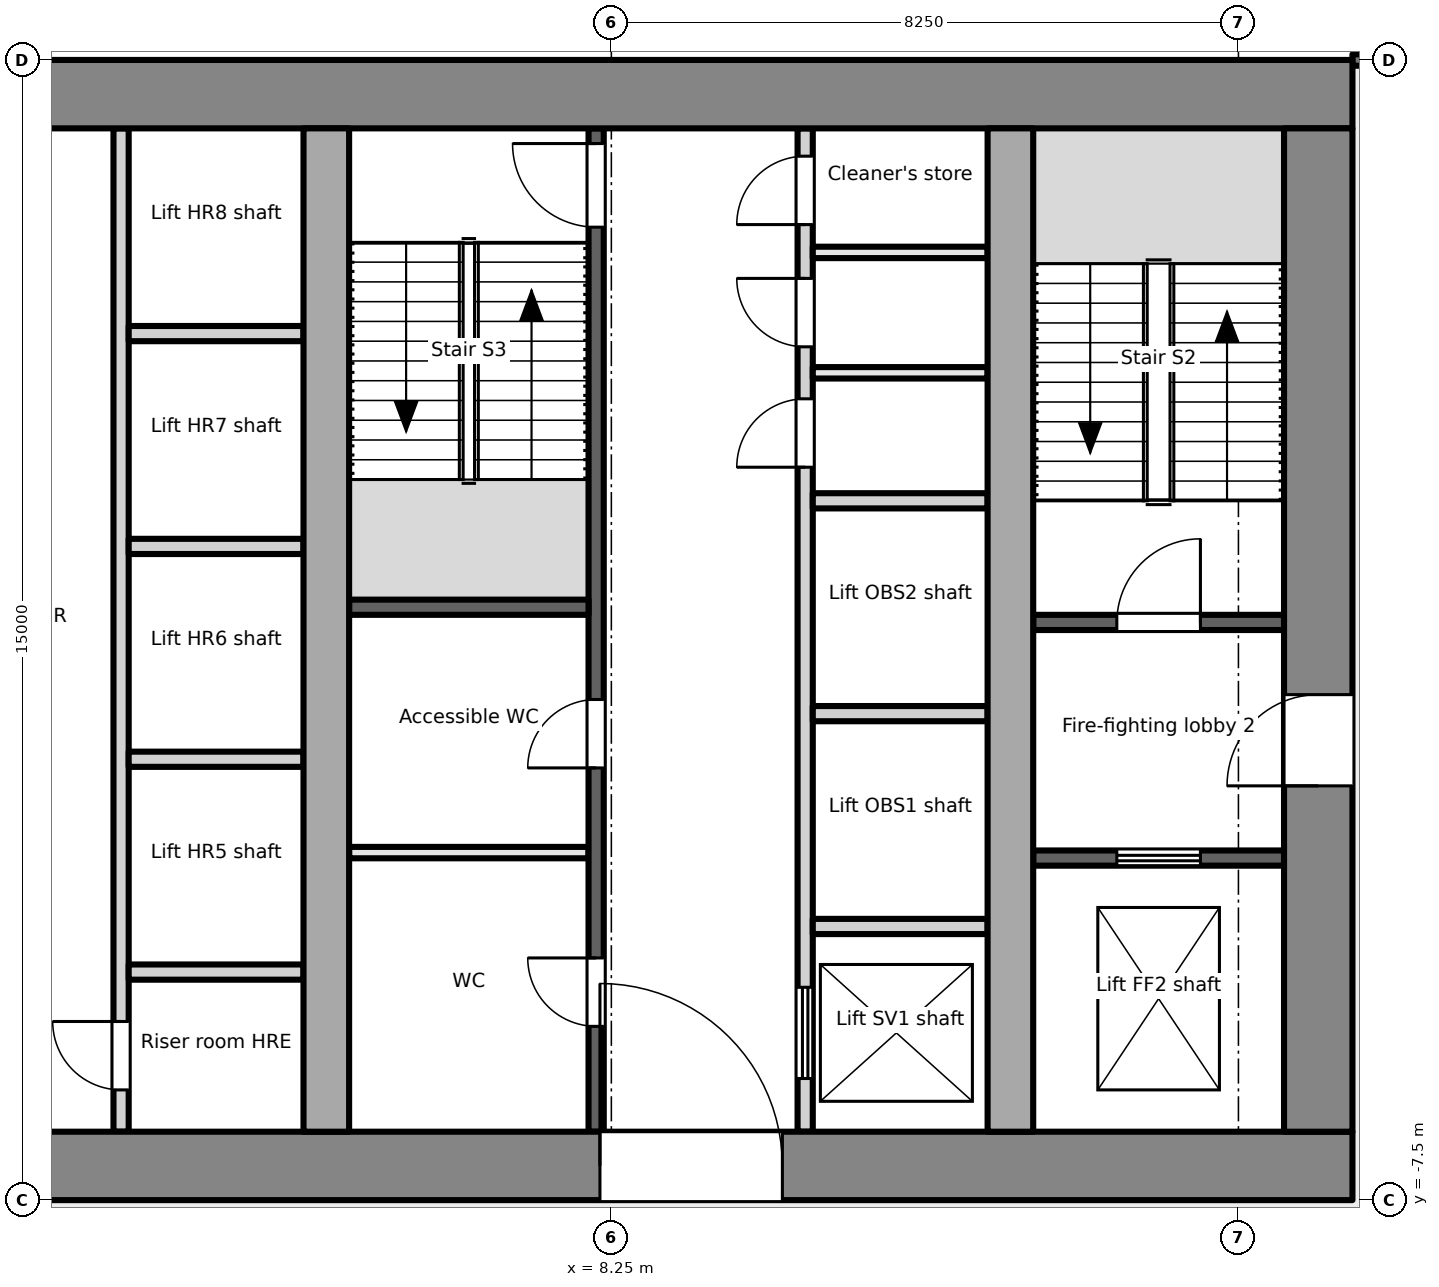
"""IFC4 building model, lengths in metres.
Left out: names, types, materials, properties, quantities, classifications, styles, units other than length and angle.
Written with IfcOpenShell. Run it as: python <this file> out.ifc"""

import sys

from ifc_helpers import new_model, si_unit, direction, frame, frame_2d, origin, place, context, subcontext, project, spatial, rectangle, extrude, element, fill, save


model = new_model("IFC4")
c1 = context("Model", 3, precision=1e-05, world=origin(), true_north=direction((0.0, 1.0)))
c2 = subcontext(c1, "Body", "Model", "MODEL_VIEW")
j1 = project(units=[si_unit("LENGTHUNIT", "METRE"), si_unit("PLANEANGLEUNIT", "RADIAN")], contexts=[c1])
p1 = place(None, origin())
s1 = spatial("IfcSite", under=j1, at=p1, CompositionType="ELEMENT")
p2 = place(p1, origin())
s2 = spatial("IfcBuilding", under=s1, at=p2, CompositionType="ELEMENT")
p3 = place(p2, frame((0.0, 0.0, 12.6)))
s3 = spatial("IfcBuildingStorey", under=s2, at=p3, CompositionType="ELEMENT", Elevation=12.6)
p4 = place(p3, frame((-18.0, -7.05, -0.2), z_axis=(0.0, 0.0, 1.0), x_axis=(1.0, 0.0, 0.0)))
e1 = element("IfcWall", 1, at=p4, inside=s3, PredefinedType="SHEAR", context=c2, shape_type="SweptSolid", body=[
    extrude(rectangle(XDim=36.0, YDim=0.9, at=frame_2d((18.0, 0.0))), origin(), (0.0, 0.0, 1.0), 4.8),
])
p5 = place(p4, frame((7.8, 0.0, 0.2)))
e2 = element("IfcOpeningElement", 2, at=p5, cuts=e1, PredefinedType="OPENING", context=c2, shape_type="SweptSolid", body=[
    extrude(rectangle(XDim=2.4, YDim=2.1, at=frame_2d((1.2, 1.05))), frame((0.0, 0.46, 0.0), z_axis=(0.0, -1.0, 0.0), x_axis=(1.0, 0.0, 0.0)), (0.0, 0.0, 1.0), 0.921),
])
p6 = place(p4, frame((17.4, 0.0, 0.2)))
e3 = element("IfcOpeningElement", 3, at=p6, cuts=e1, PredefinedType="OPENING", context=c2, shape_type="SweptSolid", body=[
    extrude(rectangle(XDim=1.2, YDim=2.1, at=frame_2d((0.6, 1.05))), frame((0.0, 0.46, 0.0), z_axis=(0.0, -1.0, 0.0), x_axis=(1.0, 0.0, 0.0)), (0.0, 0.0, 1.0), 0.921),
])
p7 = place(p4, frame((26.1, 0.0, 0.2)))
e4 = element("IfcOpeningElement", 4, at=p7, cuts=e1, PredefinedType="OPENING", context=c2, shape_type="SweptSolid", body=[
    extrude(rectangle(XDim=2.4, YDim=2.1, at=frame_2d((1.2, 1.05))), frame((0.0, 0.46, 0.0), z_axis=(0.0, -1.0, 0.0), x_axis=(1.0, 0.0, 0.0)), (0.0, 0.0, 1.0), 0.921),
])
p8 = place(p3, frame((-18.0, 7.05, -0.2), z_axis=(0.0, 0.0, 1.0), x_axis=(1.0, 0.0, 0.0)))
e5 = element("IfcWall", 5, at=p8, inside=s3, PredefinedType="SHEAR", context=c2, shape_type="SweptSolid", body=[
    extrude(rectangle(XDim=36.0, YDim=0.9, at=frame_2d((18.0, 0.0))), origin(), (0.0, 0.0, 1.0), 4.8),
])
p9 = place(p3, frame((17.55, -6.6, -0.2), z_axis=(0.0, 0.0, 1.0), x_axis=(0.0, 1.0, 0.0)))
e6 = element("IfcWall", 6, at=p9, inside=s3, PredefinedType="SHEAR", context=c2, shape_type="SweptSolid", body=[
    extrude(rectangle(XDim=13.2, YDim=0.9, at=frame_2d((6.6, 0.0))), origin(), (0.0, 0.0, 1.0), 4.8),
])
p10 = place(p9, frame((4.55, 0.0, 0.2)))
e7 = element("IfcOpeningElement", 7, at=p10, cuts=e6, PredefinedType="OPENING", context=c2, shape_type="SweptSolid", body=[
    extrude(rectangle(XDim=1.2, YDim=2.1, at=frame_2d((0.6, 1.05))), frame((0.0, 0.46, 0.0), z_axis=(0.0, -1.0, 0.0), x_axis=(1.0, 0.0, 0.0)), (0.0, 0.0, 1.0), 0.921),
])
for number, where, z_axis, x_axis in (
    (8, (4.5, -6.6, -0.2), (0.0, 0.0, 1.0), (0.0, 1.0, 0.0)),
    (9, (13.5, -6.6, -0.2), (0.0, 0.0, 1.0), (0.0, 1.0, 0.0)),
):
    element("IfcWall", number, at=place(p3, frame(where, z_axis=z_axis, x_axis=x_axis)), inside=s3, PredefinedType="SHEAR", context=c2, shape_type="SweptSolid", body=[
        extrude(rectangle(XDim=13.2, YDim=0.6, at=frame_2d((6.6, 0.0))), origin(), (0.0, 0.0, 1.0), 4.8),
    ])
p11 = place(p3, frame((13.8, -3.0, 0.0), z_axis=(0.0, 0.0, 1.0), x_axis=(1.0, 0.0, 0.0)))
e10 = element("IfcWall", 10, at=p11, inside=s3, PredefinedType="PARTITIONING", context=c2, shape_type="SweptSolid", body=[
    extrude(rectangle(XDim=3.3, YDim=0.2, at=frame_2d((1.65, 0.0))), origin(), (0.0, 0.0, 1.0), 4.6),
])
p12 = place(p11, frame((1.1, 0.0, 0.0)))
e11 = element("IfcOpeningElement", 11, at=p12, cuts=e10, PredefinedType="OPENING", context=c2, shape_type="SweptSolid", body=[
    extrude(rectangle(XDim=1.1, YDim=2.1, at=frame_2d((0.55, 1.05))), frame((0.0, 0.111, 0.0), z_axis=(0.0, -1.0, 0.0), x_axis=(1.0, 0.0, 0.0)), (0.0, 0.0, 1.0), 0.221),
])
p13 = place(p3, frame((13.8, 0.1, 0.0), z_axis=(0.0, 0.0, 1.0), x_axis=(1.0, 0.0, 0.0)))
e12 = element("IfcWall", 12, at=p13, inside=s3, PredefinedType="PARTITIONING", context=c2, shape_type="SweptSolid", body=[
    extrude(rectangle(XDim=3.3, YDim=0.2, at=frame_2d((1.65, 0.0))), origin(), (0.0, 0.0, 1.0), 4.6),
])
p14 = place(p13, frame((1.1, 0.0, 0.0)))
e13 = element("IfcOpeningElement", 13, at=p14, cuts=e12, PredefinedType="OPENING", context=c2, shape_type="SweptSolid", body=[
    extrude(rectangle(XDim=1.1, YDim=2.1, at=frame_2d((0.55, 1.05))), frame((0.0, 0.111, 0.0), z_axis=(0.0, -1.0, 0.0), x_axis=(1.0, 0.0, 0.0)), (0.0, 0.0, 1.0), 0.221),
])
p15 = place(p3, frame((1.8, -6.6, 0.0), z_axis=(0.0, 0.0, 1.0), x_axis=(0.0, 1.0, 0.0)))
e14 = element("IfcWall", 14, at=p15, inside=s3, PredefinedType="PARTITIONING", context=c2, shape_type="SweptSolid", body=[
    extrude(rectangle(XDim=13.2, YDim=0.2, at=frame_2d((6.6, 0.0))), origin(), (0.0, 0.0, 1.0), 4.6),
])
p16 = place(p15, frame((0.55, 0.0, 0.0)))
e15 = element("IfcOpeningElement", 15, at=p16, cuts=e14, PredefinedType="OPENING", context=c2, shape_type="SweptSolid", body=[
    extrude(rectangle(XDim=0.9, YDim=2.1, at=frame_2d((0.45, 1.05))), frame((0.0, 0.111, 0.0), z_axis=(0.0, -1.0, 0.0), x_axis=(1.0, 0.0, 0.0)), (0.0, 0.0, 1.0), 0.221),
])
for number, where, z_axis, x_axis in (
    (16, (1.9, -1.7, 0.0), (0.0, 0.0, 1.0), (1.0, 0.0, 0.0)),
    (17, (1.9, 1.1, 0.0), (0.0, 0.0, 1.0), (1.0, 0.0, 0.0)),
    (18, (1.9, 3.9, 0.0), (0.0, 0.0, 1.0), (1.0, 0.0, 0.0)),
    (19, (1.9, -4.5, 0.0), (0.0, 0.0, 1.0), (1.0, 0.0, 0.0)),
):
    element("IfcWall", number, at=place(p3, frame(where, z_axis=z_axis, x_axis=x_axis)), inside=s3, PredefinedType="PARTITIONING", context=c2, shape_type="SweptSolid", body=[
        extrude(rectangle(XDim=2.3, YDim=0.2, at=frame_2d((1.15, 0.0))), origin(), (0.0, 0.0, 1.0), 4.6),
    ])
p17 = place(p3, frame((8.05, -6.6, 0.0), z_axis=(0.0, 0.0, 1.0), x_axis=(0.0, 1.0, 0.0)))
e20 = element("IfcWall", 20, at=p17, inside=s3, PredefinedType="PARTITIONING", context=c2, shape_type="SweptSolid", body=[
    extrude(rectangle(XDim=13.2, YDim=0.2, at=frame_2d((6.6, 0.0))), origin(), (0.0, 0.0, 1.0), 4.6),
])
p18 = place(p17, frame((1.386, 0.0, 0.0)))
e21 = element("IfcOpeningElement", 21, at=p18, cuts=e20, PredefinedType="OPENING", context=c2, shape_type="SweptSolid", body=[
    extrude(rectangle(XDim=0.9, YDim=2.1, at=frame_2d((0.45, 1.05))), frame((0.0, 0.111, 0.0), z_axis=(0.0, -1.0, 0.0), x_axis=(1.0, 0.0, 0.0)), (0.0, 0.0, 1.0), 0.221),
])
p19 = place(p17, frame((4.786, 0.0, 0.0)))
e22 = element("IfcOpeningElement", 22, at=p19, cuts=e20, PredefinedType="OPENING", context=c2, shape_type="SweptSolid", body=[
    extrude(rectangle(XDim=0.9, YDim=2.1, at=frame_2d((0.45, 1.05))), frame((0.0, 0.111, 0.0), z_axis=(0.0, -1.0, 0.0), x_axis=(1.0, 0.0, 0.0)), (0.0, 0.0, 1.0), 0.221),
])
p20 = place(p17, frame((11.9, 0.0, 0.0)))
e23 = element("IfcOpeningElement", 23, at=p20, cuts=e20, PredefinedType="OPENING", context=c2, shape_type="SweptSolid", body=[
    extrude(rectangle(XDim=1.1, YDim=2.1, at=frame_2d((0.55, 1.05))), frame((0.0, 0.111, 0.0), z_axis=(0.0, -1.0, 0.0), x_axis=(1.0, 0.0, 0.0)), (0.0, 0.0, 1.0), 0.221),
])
p21 = place(p3, frame((10.8, -6.6, 0.0), z_axis=(0.0, 0.0, 1.0), x_axis=(0.0, 1.0, 0.0)))
e24 = element("IfcWall", 24, at=p21, inside=s3, PredefinedType="PARTITIONING", context=c2, shape_type="SweptSolid", body=[
    extrude(rectangle(XDim=13.2, YDim=0.2, at=frame_2d((6.6, 0.0))), origin(), (0.0, 0.0, 1.0), 4.6),
])
p22 = place(p21, frame((0.7, 0.0, 0.0)))
e25 = element("IfcOpeningElement", 25, at=p22, cuts=e24, PredefinedType="OPENING", context=c2, shape_type="SweptSolid", body=[
    extrude(rectangle(XDim=1.2, YDim=2.1, at=frame_2d((0.6, 1.05))), frame((0.0, 0.111, 0.0), z_axis=(0.0, -1.0, 0.0), x_axis=(1.0, 0.0, 0.0)), (0.0, 0.0, 1.0), 0.221),
])
p23 = place(p21, frame((8.742, 0.0, 0.0)))
e26 = element("IfcOpeningElement", 26, at=p23, cuts=e24, PredefinedType="OPENING", context=c2, shape_type="SweptSolid", body=[
    extrude(rectangle(XDim=0.9, YDim=2.1, at=frame_2d((0.45, 1.05))), frame((0.0, 0.111, 0.0), z_axis=(0.0, -1.0, 0.0), x_axis=(1.0, 0.0, 0.0)), (0.0, 0.0, 1.0), 0.221),
])
p24 = place(p21, frame((10.326, 0.0, 0.0)))
e27 = element("IfcOpeningElement", 27, at=p24, cuts=e24, PredefinedType="OPENING", context=c2, shape_type="SweptSolid", body=[
    extrude(rectangle(XDim=0.9, YDim=2.1, at=frame_2d((0.45, 1.05))), frame((0.0, 0.111, 0.0), z_axis=(0.0, -1.0, 0.0), x_axis=(1.0, 0.0, 0.0)), (0.0, 0.0, 1.0), 0.221),
])
p25 = place(p21, frame((11.934, 0.0, 0.0)))
e28 = element("IfcOpeningElement", 28, at=p25, cuts=e24, PredefinedType="OPENING", context=c2, shape_type="SweptSolid", body=[
    extrude(rectangle(XDim=0.9, YDim=2.1, at=frame_2d((0.45, 1.05))), frame((0.0, 0.111, 0.0), z_axis=(0.0, -1.0, 0.0), x_axis=(1.0, 0.0, 0.0)), (0.0, 0.0, 1.0), 0.221),
])
p26 = place(p3, frame((4.8, 0.3, 0.0), z_axis=(0.0, 0.0, 1.0), x_axis=(1.0, 0.0, 0.0)))
e29 = element("IfcWall", 29, at=p26, inside=s3, PredefinedType="PARTITIONING", context=c2, shape_type="SweptSolid", body=[
    extrude(rectangle(XDim=3.15, YDim=0.2, at=frame_2d((1.575, 0.0))), origin(), (0.0, 0.0, 1.0), 4.6),
])
p27 = place(p3, frame((4.8, -2.928, 0.0), z_axis=(0.0, 0.0, 1.0), x_axis=(1.0, 0.0, 0.0)))
e30 = element("IfcWall", 30, at=p27, inside=s3, PredefinedType="PARTITIONING", context=c2, shape_type="SweptSolid", body=[
    extrude(rectangle(XDim=3.15, YDim=0.15, at=frame_2d((1.575, 0.0))), origin(), (0.0, 0.0, 1.0), 4.6),
])
for number, where, z_axis, x_axis in (
    (31, (10.9, -3.9, 0.0), (0.0, 0.0, 1.0), (1.0, 0.0, 0.0)),
    (32, (10.9, -1.1, 0.0), (0.0, 0.0, 1.0), (1.0, 0.0, 0.0)),
    (33, (10.9, 1.7, 0.0), (0.0, 0.0, 1.0), (1.0, 0.0, 0.0)),
):
    element("IfcWall", number, at=place(p3, frame(where, z_axis=z_axis, x_axis=x_axis)), inside=s3, PredefinedType="PARTITIONING", context=c2, shape_type="SweptSolid", body=[
        extrude(rectangle(XDim=2.3, YDim=0.2, at=frame_2d((1.15, 0.0))), origin(), (0.0, 0.0, 1.0), 4.6),
    ])
for number, where, z_axis, x_axis in (
    (34, (10.9, 3.384, 0.0), (0.0, 0.0, 1.0), (1.0, 0.0, 0.0)),
    (35, (10.9, 4.968, 0.0), (0.0, 0.0, 1.0), (1.0, 0.0, 0.0)),
):
    element("IfcWall", number, at=place(p3, frame(where, z_axis=z_axis, x_axis=x_axis)), inside=s3, PredefinedType="PARTITIONING", context=c2, shape_type="SweptSolid", body=[
        extrude(rectangle(XDim=2.3, YDim=0.15, at=frame_2d((1.15, 0.0))), origin(), (0.0, 0.0, 1.0), 4.6),
    ])
p28 = place(p3, frame((18.0, 7.499, 0.0), z_axis=(0.0, 0.0, 1.0), x_axis=(1.0, 0.0, 0.0)))
e36 = element("IfcWall", 36, at=p28, inside=s3, PredefinedType="PARTITIONING", context=c2, shape_type="SweptSolid", body=[
    extrude(rectangle(XDim=2.91, YDim=0.15, at=frame_2d((1.455, 0.0))), origin(), (0.0, 0.0, 1.0), 4.3),
])
p29 = place(p28, frame((0.628, 0.0, 0.0)))
e37 = element("IfcOpeningElement", 37, at=p29, cuts=e36, PredefinedType="OPENING", context=c2, shape_type="SweptSolid", body=[
    extrude(rectangle(XDim=0.9, YDim=2.1, at=frame_2d((0.45, 1.05))), frame((0.0, 0.085, 0.0), z_axis=(0.0, -1.0, 0.0), x_axis=(1.0, 0.0, 0.0)), (0.0, 0.0, 1.0), 0.171),
])
p30 = place(p12, origin())
e38 = element("IfcDoor", 38, at=p30, inside=s3, OperationType="DOUBLE_DOOR_SLIDING", PredefinedType="DOOR", context=c2, shape_type="SweptSolid", body=[
    extrude(rectangle(XDim=1.1, YDim=2.1, at=frame_2d((0.55, 1.05))), frame((0.0, 0.025, 0.0), z_axis=(0.0, -1.0, 0.0), x_axis=(1.0, 0.0, 0.0)), (0.0, 0.0, 1.0), 0.05),
])
fill(e11, e38)
p31 = place(p10, origin())
e39 = element("IfcDoor", 39, at=p31, inside=s3, OperationType="SINGLE_SWING_LEFT", PredefinedType="DOOR", context=c2, shape_type="SweptSolid", body=[
    extrude(rectangle(XDim=1.2, YDim=2.1, at=frame_2d((0.6, 1.05))), frame((0.0, 0.025, 0.0), z_axis=(0.0, -1.0, 0.0), x_axis=(1.0, 0.0, 0.0)), (0.0, 0.0, 1.0), 0.05),
])
fill(e7, e39)
p32 = place(p14, origin())
e40 = element("IfcDoor", 40, at=p32, inside=s3, OperationType="SINGLE_SWING_RIGHT", PredefinedType="DOOR", context=c2, shape_type="SweptSolid", body=[
    extrude(rectangle(XDim=1.1, YDim=2.1, at=frame_2d((0.55, 1.05))), frame((0.0, 0.025, 0.0), z_axis=(0.0, -1.0, 0.0), x_axis=(1.0, 0.0, 0.0)), (0.0, 0.0, 1.0), 0.05),
])
fill(e13, e40)
p33 = place(p16, origin())
e41 = element("IfcDoor", 41, at=p33, inside=s3, OperationType="SINGLE_SWING_RIGHT", PredefinedType="DOOR", context=c2, shape_type="SweptSolid", body=[
    extrude(rectangle(XDim=0.9, YDim=2.1, at=frame_2d((0.45, 1.05))), frame((0.0, 0.025, 0.0), z_axis=(0.0, -1.0, 0.0), x_axis=(1.0, 0.0, 0.0)), (0.0, 0.0, 1.0), 0.05),
])
fill(e15, e41)
p34 = place(p18, origin())
e42 = element("IfcDoor", 42, at=p34, inside=s3, OperationType="SINGLE_SWING_RIGHT", PredefinedType="DOOR", context=c2, shape_type="SweptSolid", body=[
    extrude(rectangle(XDim=0.9, YDim=2.1, at=frame_2d((0.45, 1.05))), frame((0.0, 0.025, 0.0), z_axis=(0.0, -1.0, 0.0), x_axis=(1.0, 0.0, 0.0)), (0.0, 0.0, 1.0), 0.05),
])
fill(e21, e42)
p35 = place(p19, origin())
e43 = element("IfcDoor", 43, at=p35, inside=s3, OperationType="SINGLE_SWING_LEFT", PredefinedType="DOOR", context=c2, shape_type="SweptSolid", body=[
    extrude(rectangle(XDim=0.9, YDim=2.1, at=frame_2d((0.45, 1.05))), frame((0.0, 0.025, 0.0), z_axis=(0.0, -1.0, 0.0), x_axis=(1.0, 0.0, 0.0)), (0.0, 0.0, 1.0), 0.05),
])
fill(e22, e43)
p36 = place(p20, origin())
e44 = element("IfcDoor", 44, at=p36, inside=s3, OperationType="SINGLE_SWING_RIGHT", PredefinedType="DOOR", context=c2, shape_type="SweptSolid", body=[
    extrude(rectangle(XDim=1.1, YDim=2.1, at=frame_2d((0.55, 1.05))), frame((0.0, 0.025, 0.0), z_axis=(0.0, -1.0, 0.0), x_axis=(1.0, 0.0, 0.0)), (0.0, 0.0, 1.0), 0.05),
])
fill(e23, e44)
p37 = place(p7, origin())
e45 = element("IfcDoor", 45, at=p37, inside=s3, OperationType="DOUBLE_DOOR_DOUBLE_SWING", PredefinedType="DOOR", context=c2, shape_type="SweptSolid", body=[
    extrude(rectangle(XDim=2.4, YDim=2.1, at=frame_2d((1.2, 1.05))), frame((0.0, 0.025, 0.0), z_axis=(0.0, -1.0, 0.0), x_axis=(1.0, 0.0, 0.0)), (0.0, 0.0, 1.0), 0.05),
])
fill(e4, e45)
p38 = place(p22, origin())
e46 = element("IfcDoor", 46, at=p38, inside=s3, OperationType="DOUBLE_DOOR_SLIDING", PredefinedType="DOOR", context=c2, shape_type="SweptSolid", body=[
    extrude(rectangle(XDim=1.2, YDim=2.1, at=frame_2d((0.6, 1.05))), frame((0.0, 0.025, 0.0), z_axis=(0.0, -1.0, 0.0), x_axis=(1.0, 0.0, 0.0)), (0.0, 0.0, 1.0), 0.05),
])
fill(e25, e46)
p39 = place(p23, origin())
e47 = element("IfcDoor", 47, at=p39, inside=s3, OperationType="SINGLE_SWING_LEFT", PredefinedType="DOOR", context=c2, shape_type="SweptSolid", body=[
    extrude(rectangle(XDim=0.9, YDim=2.1, at=frame_2d((0.45, 1.05))), frame((0.0, 0.025, 0.0), z_axis=(0.0, -1.0, 0.0), x_axis=(1.0, 0.0, 0.0)), (0.0, 0.0, 1.0), 0.05),
])
fill(e26, e47)
p40 = place(p24, origin())
e48 = element("IfcDoor", 48, at=p40, inside=s3, OperationType="SINGLE_SWING_RIGHT", PredefinedType="DOOR", context=c2, shape_type="SweptSolid", body=[
    extrude(rectangle(XDim=0.9, YDim=2.1, at=frame_2d((0.45, 1.05))), frame((0.0, 0.025, 0.0), z_axis=(0.0, -1.0, 0.0), x_axis=(1.0, 0.0, 0.0)), (0.0, 0.0, 1.0), 0.05),
])
fill(e27, e48)
p41 = place(p25, origin())
e49 = element("IfcDoor", 49, at=p41, inside=s3, OperationType="SINGLE_SWING_LEFT", PredefinedType="DOOR", context=c2, shape_type="SweptSolid", body=[
    extrude(rectangle(XDim=0.9, YDim=2.1, at=frame_2d((0.45, 1.05))), frame((0.0, 0.025, 0.0), z_axis=(0.0, -1.0, 0.0), x_axis=(1.0, 0.0, 0.0)), (0.0, 0.0, 1.0), 0.05),
])
fill(e28, e49)
save(model, sys.argv[1])
